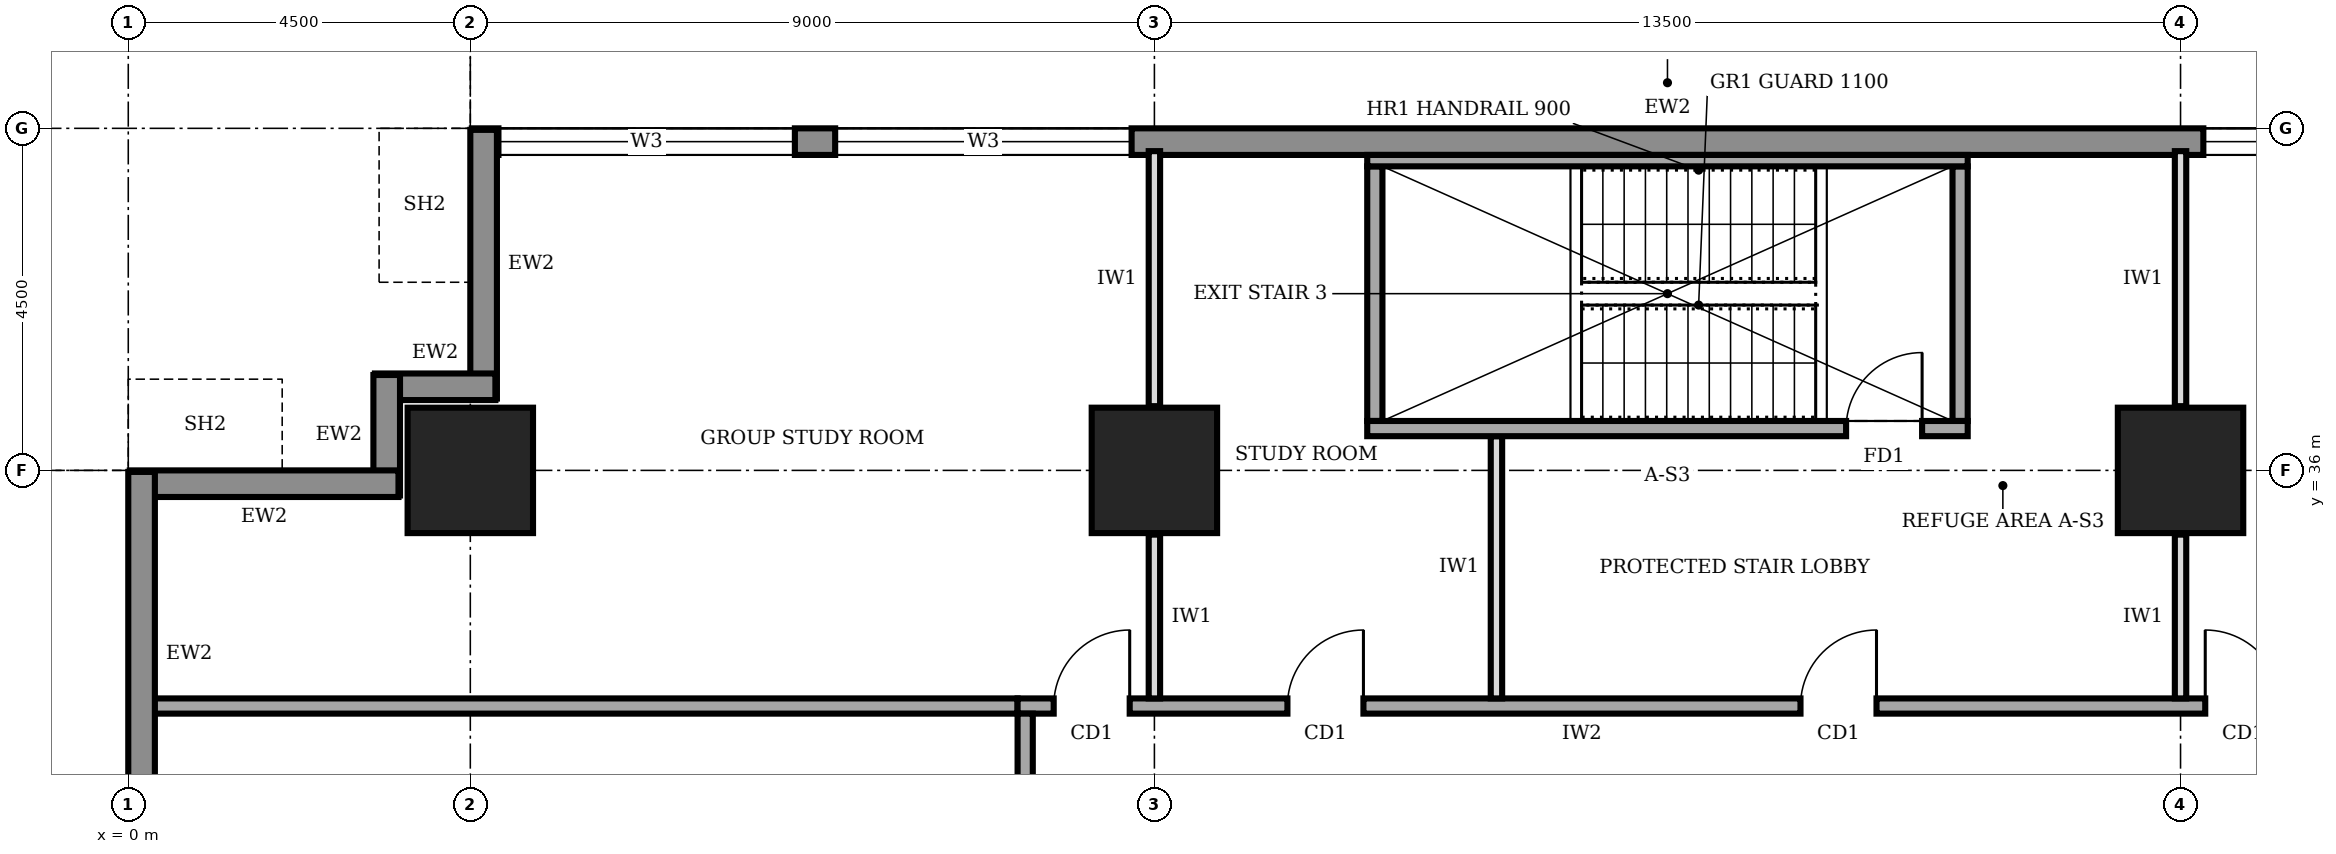
"""IFC4 building model, lengths in metres.
Left out: names, types, materials, properties, quantities, classifications, styles, units other than length and angle.
Written with IfcOpenShell. Run it as: python <this file> out.ifc"""

import sys

from ifc_helpers import new_model, si_unit, direction, frame, frame_2d, origin, origin_2d, place, context, subcontext, project, spatial, rectangle, extrude, element, fill, save


model = new_model("IFC4")
c1 = context("Model", 3, precision=1e-05, world=origin(), true_north=direction((0.0, 1.0)))
c2 = subcontext(c1, "Body", "Model", "MODEL_VIEW")
j1 = project(units=[si_unit("LENGTHUNIT", "METRE"), si_unit("PLANEANGLEUNIT", "RADIAN")], contexts=[c1])
p1 = place(None, origin())
s1 = spatial("IfcSite", under=j1, at=p1, CompositionType="ELEMENT")
p2 = place(p1, origin())
s2 = spatial("IfcBuilding", under=s1, at=p2, CompositionType="ELEMENT")
p3 = place(p2, frame((0.0, 0.0, 197.0)))
s3 = spatial("IfcBuildingStorey", under=s2, at=p3, CompositionType="ELEMENT", Elevation=197.0)
for number, where, z_axis, x_axis in (
    (1, (4.5, 36.0, 0.0), (0.0, 0.0, 1.0), (1.0, 0.0, 0.0)),
    (2, (13.5, 36.0, 0.0), (0.0, 0.0, 1.0), (1.0, 0.0, 0.0)),
    (3, (27.0, 36.0, 0.0), (0.0, 0.0, 1.0), (1.0, 0.0, 0.0)),
):
    element("IfcColumn", number, at=place(p3, frame(where, z_axis=z_axis, x_axis=x_axis)), inside=s3, PredefinedType="COLUMN", context=c2, shape_type="SweptSolid", body=[
        extrude(rectangle(XDim=1.65, YDim=1.65, at=origin_2d()), origin(), (0.0, 0.0, 1.0), 4.0),
    ])
p4 = place(p3, frame((35.98, 40.325, 0.0), z_axis=(0.0, 0.0, 1.0), x_axis=(-1.0, 0.0, 0.0)))
e4 = element("IfcWall", 4, at=p4, inside=s3, PredefinedType="STANDARD", context=c2, shape_type="SweptSolid", body=[
    extrude(rectangle(XDim=31.46, YDim=0.35, at=frame_2d((15.73, 0.0))), origin(), (0.0, 0.0, 1.0), 3.75),
])
p5 = place(p4, frame((27.21, 0.0, 0.95)))
e5 = element("IfcOpeningElement", 5, at=p5, cuts=e4, PredefinedType="OPENING", context=c2, shape_type="SweptSolid", body=[
    extrude(rectangle(XDim=3.9, YDim=1.8, at=frame_2d((1.95, 0.9))), frame((0.0, 0.185, 0.0), z_axis=(0.0, -1.0, 0.0), x_axis=(1.0, 0.0, 0.0)), (0.0, 0.0, 1.0), 0.37),
])
p6 = place(p4, frame((22.78, 0.0, 0.95)))
e6 = element("IfcOpeningElement", 6, at=p6, cuts=e4, PredefinedType="OPENING", context=c2, shape_type="SweptSolid", body=[
    extrude(rectangle(XDim=3.9, YDim=1.8, at=frame_2d((1.95, 0.9))), frame((0.0, 0.185, 0.0), z_axis=(0.0, -1.0, 0.0), x_axis=(1.0, 0.0, 0.0)), (0.0, 0.0, 1.0), 0.37),
])
p7 = place(p4, frame((4.78, 0.0, 0.95)))
e7 = element("IfcOpeningElement", 7, at=p7, cuts=e4, PredefinedType="OPENING", context=c2, shape_type="SweptSolid", body=[
    extrude(rectangle(XDim=3.9, YDim=1.8, at=frame_2d((1.95, 0.9))), frame((0.0, 0.185, 0.0), z_axis=(0.0, -1.0, 0.0), x_axis=(1.0, 0.0, 0.0)), (0.0, 0.0, 1.0), 0.37),
])
p8 = place(p3, frame((4.675, 40.48, 0.0), z_axis=(0.0, 0.0, 1.0), x_axis=(0.0, -1.0, 0.0)))
e8 = element("IfcWall", 8, at=p8, inside=s3, PredefinedType="STANDARD", context=c2, shape_type="SweptSolid", body=[
    extrude(rectangle(XDim=3.535, YDim=0.35, at=frame_2d((1.768, 0.0))), origin(), (0.0, 0.0, 1.0), 2.85),
])
for number, where, z_axis, x_axis in (
    (9, (4.83, 37.1, 0.0), (0.0, 0.0, 1.0), (-1.0, 0.0, 0.0)),
    (10, (3.4, 37.255, 0.0), (0.0, 0.0, 1.0), (0.0, -1.0, 0.0)),
):
    element("IfcWall", number, at=place(p3, frame(where, z_axis=z_axis, x_axis=x_axis)), inside=s3, PredefinedType="STANDARD", context=c2, shape_type="SweptSolid", body=[
        extrude(rectangle(XDim=1.585, YDim=0.35, at=frame_2d((0.792, 0.0))), origin(), (0.0, 0.0, 1.0), 3.75),
    ])
p9 = place(p3, frame((3.555, 35.825, 0.0), z_axis=(0.0, 0.0, 1.0), x_axis=(-1.0, 0.0, 0.0)))
e11 = element("IfcWall", 11, at=p9, inside=s3, PredefinedType="STANDARD", context=c2, shape_type="SweptSolid", body=[
    extrude(rectangle(XDim=3.535, YDim=0.35, at=frame_2d((1.768, 0.0))), origin(), (0.0, 0.0, 1.0), 2.85),
])
p10 = place(p3, frame((0.175, 35.98, 0.0), z_axis=(0.0, 0.0, 1.0), x_axis=(0.0, -1.0, 0.0)))
e12 = element("IfcWall", 12, at=p10, inside=s3, PredefinedType="STANDARD", context=c2, shape_type="SweptSolid", body=[
    extrude(rectangle(XDim=31.46, YDim=0.35, at=frame_2d((15.73, 0.0))), origin(), (0.0, 0.0, 1.0), 3.75),
])
p11 = place(p10, frame((27.21, 0.0, 0.95)))
e13 = element("IfcOpeningElement", 13, at=p11, cuts=e12, PredefinedType="OPENING", context=c2, shape_type="SweptSolid", body=[
    extrude(rectangle(XDim=3.9, YDim=1.8, at=frame_2d((1.95, 0.9))), frame((0.0, 0.185, 0.0), z_axis=(0.0, -1.0, 0.0), x_axis=(1.0, 0.0, 0.0)), (0.0, 0.0, 1.0), 0.37),
])
p12 = place(p10, frame((22.78, 0.0, 0.95)))
e14 = element("IfcOpeningElement", 14, at=p12, cuts=e12, PredefinedType="OPENING", context=c2, shape_type="SweptSolid", body=[
    extrude(rectangle(XDim=3.9, YDim=1.8, at=frame_2d((1.95, 0.9))), frame((0.0, 0.185, 0.0), z_axis=(0.0, -1.0, 0.0), x_axis=(1.0, 0.0, 0.0)), (0.0, 0.0, 1.0), 0.37),
])
p13 = place(p10, frame((18.28, 0.0, 0.95)))
e15 = element("IfcOpeningElement", 15, at=p13, cuts=e12, PredefinedType="OPENING", context=c2, shape_type="SweptSolid", body=[
    extrude(rectangle(XDim=3.9, YDim=1.8, at=frame_2d((1.95, 0.9))), frame((0.0, 0.185, 0.0), z_axis=(0.0, -1.0, 0.0), x_axis=(1.0, 0.0, 0.0)), (0.0, 0.0, 1.0), 0.37),
])
p14 = place(p10, frame((13.78, 0.0, 0.95)))
e16 = element("IfcOpeningElement", 16, at=p14, cuts=e12, PredefinedType="OPENING", context=c2, shape_type="SweptSolid", body=[
    extrude(rectangle(XDim=3.9, YDim=1.8, at=frame_2d((1.95, 0.9))), frame((0.0, 0.185, 0.0), z_axis=(0.0, -1.0, 0.0), x_axis=(1.0, 0.0, 0.0)), (0.0, 0.0, 1.0), 0.37),
])
p15 = place(p10, frame((9.28, 0.0, 0.95)))
e17 = element("IfcOpeningElement", 17, at=p15, cuts=e12, PredefinedType="OPENING", context=c2, shape_type="SweptSolid", body=[
    extrude(rectangle(XDim=3.9, YDim=1.8, at=frame_2d((1.95, 0.9))), frame((0.0, 0.185, 0.0), z_axis=(0.0, -1.0, 0.0), x_axis=(1.0, 0.0, 0.0)), (0.0, 0.0, 1.0), 0.37),
])
p16 = place(p10, frame((4.78, 0.0, 0.95)))
e18 = element("IfcOpeningElement", 18, at=p16, cuts=e12, PredefinedType="OPENING", context=c2, shape_type="SweptSolid", body=[
    extrude(rectangle(XDim=3.9, YDim=1.8, at=frame_2d((1.95, 0.9))), frame((0.0, 0.185, 0.0), z_axis=(0.0, -1.0, 0.0), x_axis=(1.0, 0.0, 0.0)), (0.0, 0.0, 1.0), 0.37),
])
p17 = place(p3, frame((28.6, 32.9, 0.0), z_axis=(0.0, 0.0, 1.0), x_axis=(-1.0, 0.0, 0.0)))
e19 = element("IfcWall", 19, at=p17, inside=s3, PredefinedType="SOLIDWALL", context=c2, shape_type="SweptSolid", body=[
    extrude(rectangle(XDim=16.9, YDim=0.2, at=frame_2d((8.45, 0.0))), origin(), (0.0, 0.0, 1.0), 3.75),
])
p18 = place(p17, frame((15.425, 0.0, 0.0)))
e20 = element("IfcOpeningElement", 20, at=p18, cuts=e19, PredefinedType="OPENING", context=c2, shape_type="SweptSolid", body=[
    extrude(rectangle(XDim=1.0, YDim=2.1, at=frame_2d((0.5, 1.05))), frame((0.0, 0.11, 0.0), z_axis=(0.0, -1.0, 0.0), x_axis=(1.0, 0.0, 0.0)), (0.0, 0.0, 1.0), 0.22),
])
p19 = place(p17, frame((12.35, 0.0, 0.0)))
e21 = element("IfcOpeningElement", 21, at=p19, cuts=e19, PredefinedType="OPENING", context=c2, shape_type="SweptSolid", body=[
    extrude(rectangle(XDim=1.0, YDim=2.1, at=frame_2d((0.5, 1.05))), frame((0.0, 0.11, 0.0), z_axis=(0.0, -1.0, 0.0), x_axis=(1.0, 0.0, 0.0)), (0.0, 0.0, 1.0), 0.22),
])
p20 = place(p17, frame((5.6, 0.0, 0.0)))
e22 = element("IfcOpeningElement", 22, at=p20, cuts=e19, PredefinedType="OPENING", context=c2, shape_type="SweptSolid", body=[
    extrude(rectangle(XDim=1.0, YDim=2.1, at=frame_2d((0.5, 1.05))), frame((0.0, 0.11, 0.0), z_axis=(0.0, -1.0, 0.0), x_axis=(1.0, 0.0, 0.0)), (0.0, 0.0, 1.0), 0.22),
])
p21 = place(p17, frame((0.275, 0.0, 0.0)))
e23 = element("IfcOpeningElement", 23, at=p21, cuts=e19, PredefinedType="OPENING", context=c2, shape_type="SweptSolid", body=[
    extrude(rectangle(XDim=1.0, YDim=2.1, at=frame_2d((0.5, 1.05))), frame((0.0, 0.11, 0.0), z_axis=(0.0, -1.0, 0.0), x_axis=(1.0, 0.0, 0.0)), (0.0, 0.0, 1.0), 0.22),
])
p22 = place(p3, frame((11.8, 32.8, 0.0), z_axis=(0.0, 0.0, 1.0), x_axis=(0.0, -1.0, 0.0)))
e24 = element("IfcWall", 24, at=p22, inside=s3, PredefinedType="SOLIDWALL", context=c2, shape_type="SweptSolid", body=[
    extrude(rectangle(XDim=25.3, YDim=0.2, at=frame_2d((12.65, 0.0))), origin(), (0.0, 0.0, 1.0), 3.75),
])
p23 = place(p22, frame((21.8, 0.0, 0.0)))
e25 = element("IfcOpeningElement", 25, at=p23, cuts=e24, PredefinedType="OPENING", context=c2, shape_type="SweptSolid", body=[
    extrude(rectangle(XDim=1.0, YDim=2.1, at=frame_2d((0.5, 1.05))), frame((0.0, 0.11, 0.0), z_axis=(0.0, -1.0, 0.0), x_axis=(1.0, 0.0, 0.0)), (0.0, 0.0, 1.0), 0.22),
])
p24 = place(p22, frame((17.7, 0.0, 0.0)))
e26 = element("IfcOpeningElement", 26, at=p24, cuts=e24, PredefinedType="OPENING", context=c2, shape_type="SweptSolid", body=[
    extrude(rectangle(XDim=1.0, YDim=2.1, at=frame_2d((0.5, 1.05))), frame((0.0, 0.11, 0.0), z_axis=(0.0, -1.0, 0.0), x_axis=(1.0, 0.0, 0.0)), (0.0, 0.0, 1.0), 0.22),
])
p25 = place(p22, frame((14.7, 0.0, 0.0)))
e27 = element("IfcOpeningElement", 27, at=p25, cuts=e24, PredefinedType="OPENING", context=c2, shape_type="SweptSolid", body=[
    extrude(rectangle(XDim=0.9, YDim=2.1, at=frame_2d((0.45, 1.05))), frame((0.0, 0.11, 0.0), z_axis=(0.0, -1.0, 0.0), x_axis=(1.0, 0.0, 0.0)), (0.0, 0.0, 1.0), 0.22),
])
p26 = place(p22, frame((11.65, 0.0, 0.0)))
e28 = element("IfcOpeningElement", 28, at=p26, cuts=e24, PredefinedType="OPENING", context=c2, shape_type="SweptSolid", body=[
    extrude(rectangle(XDim=0.9, YDim=2.1, at=frame_2d((0.45, 1.05))), frame((0.0, 0.11, 0.0), z_axis=(0.0, -1.0, 0.0), x_axis=(1.0, 0.0, 0.0)), (0.0, 0.0, 1.0), 0.22),
])
p27 = place(p22, frame((6.95, 0.0, 0.0)))
e29 = element("IfcOpeningElement", 29, at=p27, cuts=e24, PredefinedType="OPENING", context=c2, shape_type="SweptSolid", body=[
    extrude(rectangle(XDim=0.9, YDim=2.1, at=frame_2d((0.45, 1.05))), frame((0.0, 0.11, 0.0), z_axis=(0.0, -1.0, 0.0), x_axis=(1.0, 0.0, 0.0)), (0.0, 0.0, 1.0), 0.22),
])
p28 = place(p22, frame((9.5, 0.0, 0.0)))
e30 = element("IfcOpeningElement", 30, at=p28, cuts=e24, PredefinedType="OPENING", context=c2, shape_type="SweptSolid", body=[
    extrude(rectangle(XDim=1.0, YDim=2.1, at=frame_2d((0.5, 1.05))), frame((0.0, 0.11, 0.0), z_axis=(0.0, -1.0, 0.0), x_axis=(1.0, 0.0, 0.0)), (0.0, 0.0, 1.0), 0.22),
])
p29 = place(p22, frame((2.3, 0.0, 0.0)))
e31 = element("IfcOpeningElement", 31, at=p29, cuts=e24, PredefinedType="OPENING", context=c2, shape_type="SweptSolid", body=[
    extrude(rectangle(XDim=1.0, YDim=2.1, at=frame_2d((0.5, 1.05))), frame((0.0, 0.11, 0.0), z_axis=(0.0, -1.0, 0.0), x_axis=(1.0, 0.0, 0.0)), (0.0, 0.0, 1.0), 0.22),
])
p30 = place(p3, frame((0.3, 32.9, 0.0), z_axis=(0.0, 0.0, 1.0), x_axis=(1.0, 0.0, 0.0)))
e32 = element("IfcWall", 32, at=p30, inside=s3, PredefinedType="SOLIDWALL", context=c2, shape_type="SweptSolid", body=[
    extrude(rectangle(XDim=11.4, YDim=0.2, at=frame_2d((5.7, 0.0))), origin(), (0.0, 0.0, 1.0), 3.75),
])
p31 = place(p3, frame((13.5, 33.0, 0.0), z_axis=(0.0, 0.0, 1.0), x_axis=(0.0, 1.0, 0.0)))
e33 = element("IfcWall", 33, at=p31, inside=s3, PredefinedType="PARTITIONING", context=c2, shape_type="SweptSolid", body=[
    extrude(rectangle(XDim=2.155, YDim=0.15, at=frame_2d((1.078, 0.0))), origin(), (0.0, 0.0, 1.0), 2.85),
])
p32 = place(p3, frame((13.5, 36.845, 0.0), z_axis=(0.0, 0.0, 1.0), x_axis=(0.0, 1.0, 0.0)))
e34 = element("IfcWall", 34, at=p32, inside=s3, PredefinedType="PARTITIONING", context=c2, shape_type="SweptSolid", body=[
    extrude(rectangle(XDim=3.355, YDim=0.15, at=frame_2d((1.677, 0.0))), origin(), (0.0, 0.0, 1.0), 2.85),
])
p33 = place(p3, frame((18.0, 33.0, 0.0), z_axis=(0.0, 0.0, 1.0), x_axis=(0.0, 1.0, 0.0)))
e35 = element("IfcWall", 35, at=p33, inside=s3, PredefinedType="PARTITIONING", context=c2, shape_type="SweptSolid", body=[
    extrude(rectangle(XDim=3.45, YDim=0.15, at=frame_2d((1.725, 0.0))), origin(), (0.0, 0.0, 1.0), 3.75),
])
p34 = place(p3, frame((27.0, 33.0, 0.0), z_axis=(0.0, 0.0, 1.0), x_axis=(0.0, 1.0, 0.0)))
e36 = element("IfcWall", 36, at=p34, inside=s3, PredefinedType="PARTITIONING", context=c2, shape_type="SweptSolid", body=[
    extrude(rectangle(XDim=2.155, YDim=0.15, at=frame_2d((1.078, 0.0))), origin(), (0.0, 0.0, 1.0), 2.85),
])
p35 = place(p3, frame((27.0, 36.845, 0.0), z_axis=(0.0, 0.0, 1.0), x_axis=(0.0, 1.0, 0.0)))
e37 = element("IfcWall", 37, at=p35, inside=s3, PredefinedType="PARTITIONING", context=c2, shape_type="SweptSolid", body=[
    extrude(rectangle(XDim=3.355, YDim=0.15, at=frame_2d((1.677, 0.0))), origin(), (0.0, 0.0, 1.0), 2.85),
])
p36 = place(p3, frame((16.3, 36.55, 0.0), z_axis=(0.0, 0.0, 1.0), x_axis=(1.0, 0.0, 0.0)))
e38 = element("IfcWall", 38, at=p36, inside=s3, PredefinedType="SOLIDWALL", context=c2, shape_type="SweptSolid", body=[
    extrude(rectangle(XDim=7.9, YDim=0.2, at=frame_2d((3.95, 0.0))), origin(), (0.0, 0.0, 1.0), 3.75),
])
p37 = place(p36, frame((6.3, 0.0, 0.0)))
e39 = element("IfcOpeningElement", 39, at=p37, cuts=e38, PredefinedType="OPENING", context=c2, shape_type="SweptSolid", body=[
    extrude(rectangle(XDim=1.0, YDim=2.1, at=frame_2d((0.5, 1.05))), frame((0.0, 0.11, 0.0), z_axis=(0.0, -1.0, 0.0), x_axis=(1.0, 0.0, 0.0)), (0.0, 0.0, 1.0), 0.22),
])
p38 = place(p3, frame((16.3, 40.075, 0.0), z_axis=(0.0, 0.0, 1.0), x_axis=(1.0, 0.0, 0.0)))
e40 = element("IfcWall", 40, at=p38, inside=s3, PredefinedType="SOLIDWALL", context=c2, shape_type="SweptSolid", body=[
    extrude(rectangle(XDim=7.9, YDim=0.15, at=frame_2d((3.95, 0.0))), origin(), (0.0, 0.0, 1.0), 3.75),
])
for number, where, z_axis, x_axis in (
    (41, (16.4, 36.65, 0.0), (0.0, 0.0, 1.0), (0.0, 1.0, 0.0)),
    (42, (24.1, 36.65, 0.0), (0.0, 0.0, 1.0), (0.0, 1.0, 0.0)),
):
    element("IfcWall", number, at=place(p3, frame(where, z_axis=z_axis, x_axis=x_axis)), inside=s3, PredefinedType="SOLIDWALL", context=c2, shape_type="SweptSolid", body=[
        extrude(rectangle(XDim=3.35, YDim=0.2, at=frame_2d((1.675, 0.0))), origin(), (0.0, 0.0, 1.0), 3.75),
    ])
p39 = place(p5, origin())
e43 = element("IfcWindow", 43, at=p39, inside=s3, PartitioningType="SINGLE_PANEL", PredefinedType="WINDOW", context=c2, shape_type="SweptSolid", body=[
    extrude(rectangle(XDim=3.9, YDim=1.8, at=frame_2d((1.95, 0.9))), frame((0.0, 0.03, 0.0), z_axis=(0.0, -1.0, 0.0), x_axis=(1.0, 0.0, 0.0)), (0.0, 0.0, 1.0), 0.06),
])
fill(e5, e43)
p40 = place(p6, origin())
e44 = element("IfcWindow", 44, at=p40, inside=s3, PartitioningType="SINGLE_PANEL", PredefinedType="WINDOW", context=c2, shape_type="SweptSolid", body=[
    extrude(rectangle(XDim=3.9, YDim=1.8, at=frame_2d((1.95, 0.9))), frame((0.0, 0.03, 0.0), z_axis=(0.0, -1.0, 0.0), x_axis=(1.0, 0.0, 0.0)), (0.0, 0.0, 1.0), 0.06),
])
fill(e6, e44)
p41 = place(p7, origin())
e45 = element("IfcWindow", 45, at=p41, inside=s3, PartitioningType="SINGLE_PANEL", PredefinedType="WINDOW", context=c2, shape_type="SweptSolid", body=[
    extrude(rectangle(XDim=3.9, YDim=1.8, at=frame_2d((1.95, 0.9))), frame((0.0, 0.03, 0.0), z_axis=(0.0, -1.0, 0.0), x_axis=(1.0, 0.0, 0.0)), (0.0, 0.0, 1.0), 0.06),
])
fill(e7, e45)
p42 = place(p18, frame((1.0, 0.0, 0.0), z_axis=(0.0, 0.0, 1.0), x_axis=(-1.0, 0.0, 0.0)))
e46 = element("IfcDoor", 46, at=p42, inside=s3, OperationType="SINGLE_SWING_RIGHT", PredefinedType="DOOR", context=c2, shape_type="SweptSolid", body=[
    extrude(rectangle(XDim=1.0, YDim=2.1, at=frame_2d((0.5, 1.05))), frame((0.0, 0.025, 0.0), z_axis=(0.0, -1.0, 0.0), x_axis=(1.0, 0.0, 0.0)), (0.0, 0.0, 1.0), 0.05),
])
fill(e20, e46)
p43 = place(p19, frame((1.0, 0.0, 0.0), z_axis=(0.0, 0.0, 1.0), x_axis=(-1.0, 0.0, 0.0)))
e47 = element("IfcDoor", 47, at=p43, inside=s3, OperationType="SINGLE_SWING_RIGHT", PredefinedType="DOOR", context=c2, shape_type="SweptSolid", body=[
    extrude(rectangle(XDim=1.0, YDim=2.1, at=frame_2d((0.5, 1.05))), frame((0.0, 0.025, 0.0), z_axis=(0.0, -1.0, 0.0), x_axis=(1.0, 0.0, 0.0)), (0.0, 0.0, 1.0), 0.05),
])
fill(e21, e47)
p44 = place(p20, frame((1.0, 0.0, 0.0), z_axis=(0.0, 0.0, 1.0), x_axis=(-1.0, 0.0, 0.0)))
e48 = element("IfcDoor", 48, at=p44, inside=s3, OperationType="SINGLE_SWING_RIGHT", PredefinedType="DOOR", context=c2, shape_type="SweptSolid", body=[
    extrude(rectangle(XDim=1.0, YDim=2.1, at=frame_2d((0.5, 1.05))), frame((0.0, 0.025, 0.0), z_axis=(0.0, -1.0, 0.0), x_axis=(1.0, 0.0, 0.0)), (0.0, 0.0, 1.0), 0.05),
])
fill(e22, e48)
p45 = place(p21, frame((1.0, 0.0, 0.0), z_axis=(0.0, 0.0, 1.0), x_axis=(-1.0, 0.0, 0.0)))
e49 = element("IfcDoor", 49, at=p45, inside=s3, OperationType="SINGLE_SWING_LEFT", PredefinedType="DOOR", context=c2, shape_type="SweptSolid", body=[
    extrude(rectangle(XDim=1.0, YDim=2.1, at=frame_2d((0.5, 1.05))), frame((0.0, 0.025, 0.0), z_axis=(0.0, -1.0, 0.0), x_axis=(1.0, 0.0, 0.0)), (0.0, 0.0, 1.0), 0.05),
])
fill(e23, e49)
p46 = place(p37, origin())
e50 = element("IfcDoor", 50, at=p46, inside=s3, OperationType="SINGLE_SWING_RIGHT", PredefinedType="DOOR", context=c2, shape_type="SweptSolid", body=[
    extrude(rectangle(XDim=1.0, YDim=2.1, at=frame_2d((0.5, 1.05))), frame((0.0, 0.025, 0.0), z_axis=(0.0, -1.0, 0.0), x_axis=(1.0, 0.0, 0.0)), (0.0, 0.0, 1.0), 0.05),
])
fill(e39, e50)
save(model, sys.argv[1])
